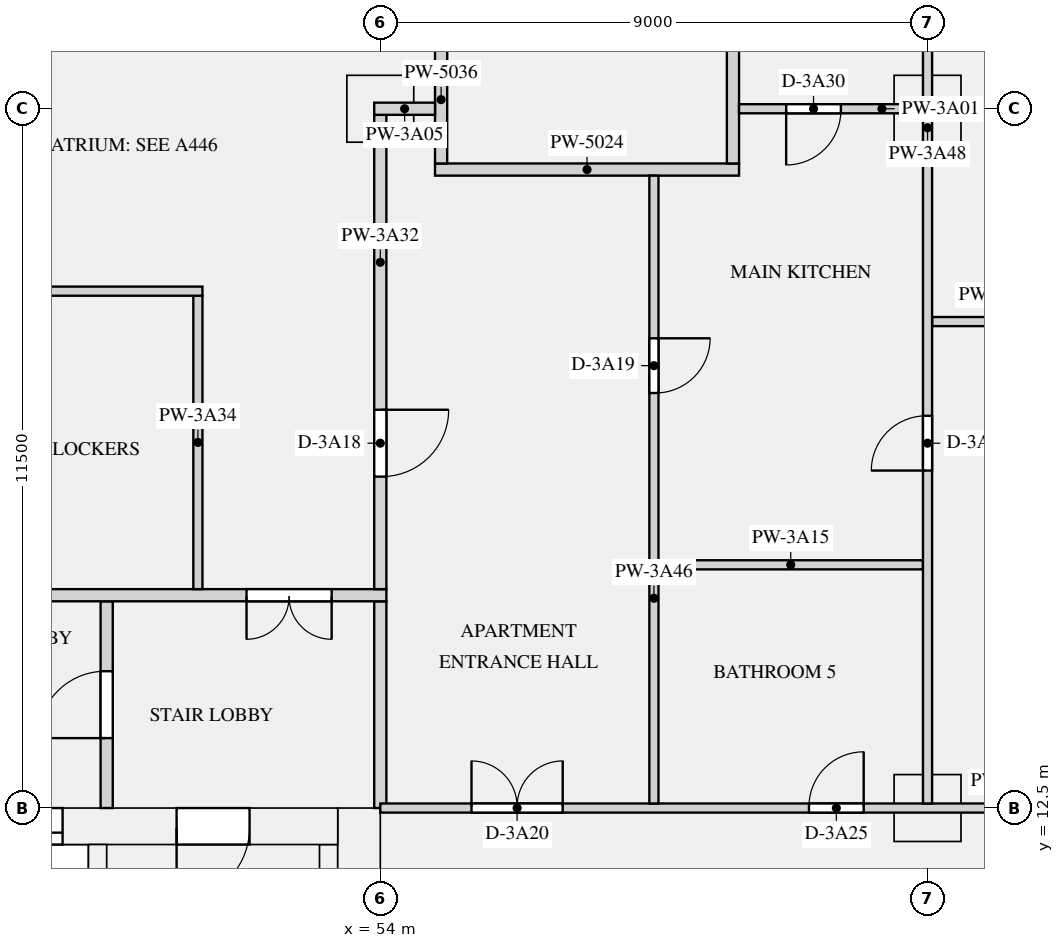
"""IFC4 building model, lengths in metres.
Left out: names, types, materials, properties, quantities, classifications, styles, units other than length and angle.
Written with IfcOpenShell. Run it as: python <this file> out.ifc"""

import sys

from ifc_helpers import new_model, si_unit, direction, frame, frame_2d, origin, origin_2d, place, context, subcontext, project, spatial, rectangle, extrude, element, fill, save


model = new_model("IFC4")
c1 = context("Model", 3, precision=1e-05, world=origin(), true_north=direction((0.0, 1.0)))
c2 = subcontext(c1, "Body", "Model", "MODEL_VIEW")
j1 = project(units=[si_unit("LENGTHUNIT", "METRE"), si_unit("PLANEANGLEUNIT", "RADIAN")], contexts=[c1])
p1 = place(None, origin())
s1 = spatial("IfcSite", under=j1, at=p1, CompositionType="ELEMENT")
p2 = place(p1, origin())
s2 = spatial("IfcBuilding", under=s1, at=p2, CompositionType="ELEMENT")
p3 = place(p2, frame((0.0, 0.0, 144.45)))
s3 = spatial("IfcBuildingStorey", under=s2, at=p3, CompositionType="ELEMENT", Elevation=144.45)
for number, where, z_axis, x_axis in (
    (1, (54.0, 24.0, 0.0), (0.0, 0.0, 1.0), (1.0, 0.0, 0.0)),
    (2, (63.0, 24.0, 0.0), (0.0, 0.0, 1.0), (1.0, 0.0, 0.0)),
    (3, (63.0, 12.5, 0.0), (0.0, 0.0, 1.0), (1.0, 0.0, 0.0)),
):
    element("IfcColumn", number, at=place(p3, frame(where, z_axis=z_axis, x_axis=x_axis)), inside=s3, PredefinedType="COLUMN", context=c2, shape_type="SweptSolid", body=[
        extrude(rectangle(XDim=1.1, YDim=1.1, at=origin_2d()), origin(), (0.0, 0.0, 1.0), 3.15),
    ])
p4 = place(p3, frame((53.65, 0.0, 0.0), z_axis=(0.0, 0.0, 1.0), x_axis=(0.0, 1.0, 0.0)))
e4 = element("IfcWall", 4, at=p4, inside=s3, PredefinedType="SHEAR", context=c2, shape_type="SweptSolid", body=[
    extrude(rectangle(XDim=12.5, YDim=0.7, at=frame_2d((6.25, 0.0))), origin(), (0.0, 0.0, 1.0), 3.15),
])
p5 = place(p3, frame((18.7, 12.2, 0.0), z_axis=(0.0, 0.0, 1.0), x_axis=(1.0, 0.0, 0.0)))
e5 = element("IfcWall", 5, at=p5, inside=s3, PredefinedType="SHEAR", context=c2, shape_type="SweptSolid", body=[
    extrude(rectangle(XDim=34.6, YDim=0.6, at=frame_2d((17.3, 0.0))), origin(), (0.0, 0.0, 1.0), 3.15),
])
p6 = place(p5, frame((24.475, 0.0, 0.0)))
e6 = element("IfcOpeningElement", 6, at=p6, cuts=e5, PredefinedType="OPENING", context=c2, shape_type="SweptSolid", body=[
    extrude(rectangle(XDim=1.1, YDim=2.1, at=frame_2d((0.55, 1.05))), frame((0.0, 0.31, 0.0), z_axis=(0.0, -1.0, 0.0), x_axis=(1.0, 0.0, 0.0)), (0.0, 0.0, 1.0), 0.62),
])
p7 = place(p5, frame((26.725, 0.0, 0.0)))
e7 = element("IfcOpeningElement", 7, at=p7, cuts=e5, PredefinedType="OPENING", context=c2, shape_type="SweptSolid", body=[
    extrude(rectangle(XDim=1.1, YDim=2.1, at=frame_2d((0.55, 1.05))), frame((0.0, 0.31, 0.0), z_axis=(0.0, -1.0, 0.0), x_axis=(1.0, 0.0, 0.0)), (0.0, 0.0, 1.0), 0.62),
])
p8 = place(p5, frame((28.975, 0.0, 0.0)))
e8 = element("IfcOpeningElement", 8, at=p8, cuts=e5, PredefinedType="OPENING", context=c2, shape_type="SweptSolid", body=[
    extrude(rectangle(XDim=1.1, YDim=2.1, at=frame_2d((0.55, 1.05))), frame((0.0, 0.31, 0.0), z_axis=(0.0, -1.0, 0.0), x_axis=(1.0, 0.0, 0.0)), (0.0, 0.0, 1.0), 0.62),
])
p9 = place(p5, frame((14.35, 0.0, 0.0)))
e9 = element("IfcOpeningElement", 9, at=p9, cuts=e5, PredefinedType="OPENING", context=c2, shape_type="SweptSolid", body=[
    extrude(rectangle(XDim=0.9, YDim=2.1, at=frame_2d((0.45, 1.05))), frame((0.0, 0.31, 0.0), z_axis=(0.0, -1.0, 0.0), x_axis=(1.0, 0.0, 0.0)), (0.0, 0.0, 1.0), 0.62),
])
p10 = place(p5, frame((1.45, 0.0, 0.0)))
e10 = element("IfcOpeningElement", 10, at=p10, cuts=e5, PredefinedType="OPENING", context=c2, shape_type="SweptSolid", body=[
    extrude(rectangle(XDim=1.2, YDim=2.1, at=frame_2d((0.6, 1.05))), frame((0.0, 0.31, 0.0), z_axis=(0.0, -1.0, 0.0), x_axis=(1.0, 0.0, 0.0)), (0.0, 0.0, 1.0), 0.62),
])
p11 = place(p5, frame((31.95, 0.0, 0.0)))
e11 = element("IfcOpeningElement", 11, at=p11, cuts=e5, PredefinedType="OPENING", context=c2, shape_type="SweptSolid", body=[
    extrude(rectangle(XDim=1.2, YDim=2.1, at=frame_2d((0.6, 1.05))), frame((0.0, 0.31, 0.0), z_axis=(0.0, -1.0, 0.0), x_axis=(1.0, 0.0, 0.0)), (0.0, 0.0, 1.0), 0.62),
])
p12 = place(p3, frame((53.15, 1.0, 0.0), z_axis=(0.0, 0.0, 1.0), x_axis=(0.0, 1.0, 0.0)))
e12 = element("IfcWall", 12, at=p12, inside=s3, PredefinedType="SHEAR", context=c2, shape_type="SweptSolid", body=[
    extrude(rectangle(XDim=10.9, YDim=0.3, at=frame_2d((5.45, 0.0))), origin(), (0.0, 0.0, 1.0), 3.15),
])
p13 = place(p3, frame((49.35, 8.25, 0.0), z_axis=(0.0, 0.0, 1.0), x_axis=(0.0, 1.0, 0.0)))
e13 = element("IfcWall", 13, at=p13, inside=s3, PredefinedType="SHEAR", context=c2, shape_type="SweptSolid", body=[
    extrude(rectangle(XDim=3.65, YDim=0.3, at=frame_2d((1.825, 0.0))), origin(), (0.0, 0.0, 1.0), 3.15),
])
p14 = place(p3, frame((54.9, 23.0, 0.0), z_axis=(0.0, 0.0, 1.0), x_axis=(1.0, 0.0, 0.0)))
e14 = element("IfcWall", 14, at=p14, inside=s3, PredefinedType="PARTITIONING", context=c2, shape_type="SweptSolid", body=[
    extrude(rectangle(XDim=5.0, YDim=0.2, at=frame_2d((2.5, 0.0))), origin(), (0.0, 0.0, 1.0), 2.83),
])
p15 = place(p3, frame((49.5, 12.5, 0.0), z_axis=(0.0, 0.0, 1.0), x_axis=(0.0, 1.0, 0.0)))
e15 = element("IfcWall", 15, at=p15, inside=s3, PredefinedType="PARTITIONING", context=c2, shape_type="SweptSolid", body=[
    extrude(rectangle(XDim=3.4, YDim=0.2, at=frame_2d((1.7, 0.0))), origin(), (0.0, 0.0, 1.0), 2.83),
])
p16 = place(p15, frame((1.15, 0.0, 0.0)))
e16 = element("IfcOpeningElement", 16, at=p16, cuts=e15, PredefinedType="OPENING", context=c2, shape_type="SweptSolid", body=[
    extrude(rectangle(XDim=1.1, YDim=2.1, at=frame_2d((0.55, 1.05))), frame((0.0, 0.11, 0.0), z_axis=(0.0, -1.0, 0.0), x_axis=(1.0, 0.0, 0.0)), (0.0, 0.0, 1.0), 0.22),
])
p17 = place(p3, frame((54.0, 12.5, 0.0), z_axis=(0.0, 0.0, 1.0), x_axis=(0.0, 1.0, 0.0)))
e17 = element("IfcWall", 17, at=p17, inside=s3, PredefinedType="PARTITIONING", context=c2, shape_type="SweptSolid", body=[
    extrude(rectangle(XDim=3.4, YDim=0.2, at=frame_2d((1.7, 0.0))), origin(), (0.0, 0.0, 1.0), 2.83),
])
p18 = place(p3, frame((55.0, 23.1, 0.0), z_axis=(0.0, 0.0, 1.0), x_axis=(0.0, 1.0, 0.0)))
e18 = element("IfcWall", 18, at=p18, inside=s3, PredefinedType="PARTITIONING", context=c2, shape_type="SweptSolid", body=[
    extrude(rectangle(XDim=3.8, YDim=0.2, at=frame_2d((1.9, 0.0))), origin(), (0.0, 0.0, 1.0), 2.83),
])
p19 = place(p18, frame((2.1, 0.0, 0.0)))
e19 = element("IfcOpeningElement", 19, at=p19, cuts=e18, PredefinedType="OPENING", context=c2, shape_type="SweptSolid", body=[
    extrude(rectangle(XDim=1.2, YDim=2.1, at=frame_2d((0.6, 1.05))), frame((0.0, 0.11, 0.0), z_axis=(0.0, -1.0, 0.0), x_axis=(1.0, 0.0, 0.0)), (0.0, 0.0, 1.0), 0.22),
])
p20 = place(p3, frame((59.8, 23.1, 0.0), z_axis=(0.0, 0.0, 1.0), x_axis=(0.0, 1.0, 0.0)))
e20 = element("IfcWall", 20, at=p20, inside=s3, PredefinedType="PARTITIONING", context=c2, shape_type="SweptSolid", body=[
    extrude(rectangle(XDim=3.9, YDim=0.2, at=frame_2d((1.95, 0.0))), origin(), (0.0, 0.0, 1.0), 2.83),
])
p21 = place(p3, frame((59.9, 24.0, 0.0), z_axis=(0.0, 0.0, 1.0), x_axis=(1.0, 0.0, 0.0)))
e21 = element("IfcWall", 21, at=p21, inside=s3, PredefinedType="PARTITIONING", context=c2, shape_type="SweptSolid", body=[
    extrude(rectangle(XDim=3.025, YDim=0.15, at=frame_2d((1.513, 0.0))), origin(), (0.0, 0.0, 1.0), 2.83),
])
p22 = place(p21, frame((0.775, 0.0, 0.0)))
e22 = element("IfcOpeningElement", 22, at=p22, cuts=e21, PredefinedType="OPENING", context=c2, shape_type="SweptSolid", body=[
    extrude(rectangle(XDim=0.9, YDim=2.1, at=frame_2d((0.45, 1.05))), frame((0.0, 0.085, 0.0), z_axis=(0.0, -1.0, 0.0), x_axis=(1.0, 0.0, 0.0)), (0.0, 0.0, 1.0), 0.17),
])
p23 = place(p3, frame((53.9, 24.0, 0.0), z_axis=(0.0, 0.0, 1.0), x_axis=(1.0, 0.0, 0.0)))
e23 = element("IfcWall", 23, at=p23, inside=s3, PredefinedType="PARTITIONING", context=c2, shape_type="SweptSolid", body=[
    extrude(rectangle(XDim=1.0, YDim=0.2, at=frame_2d((0.5, 0.0))), origin(), (0.0, 0.0, 1.0), 2.83),
])
p24 = place(p3, frame((20.925, 21.0, 0.0), z_axis=(0.0, 0.0, 1.0), x_axis=(1.0, 0.0, 0.0)))
e24 = element("IfcWall", 24, at=p24, inside=s3, PredefinedType="PARTITIONING", context=c2, shape_type="SweptSolid", body=[
    extrude(rectangle(XDim=30.15, YDim=0.15, at=frame_2d((15.075, 0.0))), origin(), (0.0, 0.0, 1.0), 2.83),
])
p25 = place(p24, frame((2.625, 0.0, 0.0)))
e25 = element("IfcOpeningElement", 25, at=p25, cuts=e24, PredefinedType="OPENING", context=c2, shape_type="SweptSolid", body=[
    extrude(rectangle(XDim=0.9, YDim=2.1, at=frame_2d((0.45, 1.05))), frame((0.0, 0.085, 0.0), z_axis=(0.0, -1.0, 0.0), x_axis=(1.0, 0.0, 0.0)), (0.0, 0.0, 1.0), 0.17),
])
p26 = place(p24, frame((8.625, 0.0, 0.0)))
e26 = element("IfcOpeningElement", 26, at=p26, cuts=e24, PredefinedType="OPENING", context=c2, shape_type="SweptSolid", body=[
    extrude(rectangle(XDim=0.9, YDim=2.1, at=frame_2d((0.45, 1.05))), frame((0.0, 0.085, 0.0), z_axis=(0.0, -1.0, 0.0), x_axis=(1.0, 0.0, 0.0)), (0.0, 0.0, 1.0), 0.17),
])
p27 = place(p24, frame((14.625, 0.0, 0.0)))
e27 = element("IfcOpeningElement", 27, at=p27, cuts=e24, PredefinedType="OPENING", context=c2, shape_type="SweptSolid", body=[
    extrude(rectangle(XDim=0.9, YDim=2.1, at=frame_2d((0.45, 1.05))), frame((0.0, 0.085, 0.0), z_axis=(0.0, -1.0, 0.0), x_axis=(1.0, 0.0, 0.0)), (0.0, 0.0, 1.0), 0.17),
])
p28 = place(p24, frame((20.625, 0.0, 0.0)))
e28 = element("IfcOpeningElement", 28, at=p28, cuts=e24, PredefinedType="OPENING", context=c2, shape_type="SweptSolid", body=[
    extrude(rectangle(XDim=0.9, YDim=2.1, at=frame_2d((0.45, 1.05))), frame((0.0, 0.085, 0.0), z_axis=(0.0, -1.0, 0.0), x_axis=(1.0, 0.0, 0.0)), (0.0, 0.0, 1.0), 0.17),
])
p29 = place(p24, frame((26.625, 0.0, 0.0)))
e29 = element("IfcOpeningElement", 29, at=p29, cuts=e24, PredefinedType="OPENING", context=c2, shape_type="SweptSolid", body=[
    extrude(rectangle(XDim=0.9, YDim=2.1, at=frame_2d((0.45, 1.05))), frame((0.0, 0.085, 0.0), z_axis=(0.0, -1.0, 0.0), x_axis=(1.0, 0.0, 0.0)), (0.0, 0.0, 1.0), 0.17),
])
p30 = place(p3, frame((54.0, 12.5, 0.0), z_axis=(0.0, 0.0, 1.0), x_axis=(1.0, 0.0, 0.0)))
e30 = element("IfcWall", 30, at=p30, inside=s3, PredefinedType="PARTITIONING", context=c2, shape_type="SweptSolid", body=[
    extrude(rectangle(XDim=17.3, YDim=0.15, at=frame_2d((8.65, 0.0))), origin(), (0.0, 0.0, 1.0), 2.83),
])
p31 = place(p30, frame((1.5, 0.0, 0.0)))
e31 = element("IfcOpeningElement", 31, at=p31, cuts=e30, PredefinedType="OPENING", context=c2, shape_type="SweptSolid", body=[
    extrude(rectangle(XDim=1.5, YDim=2.1, at=frame_2d((0.75, 1.05))), frame((0.0, 0.085, 0.0), z_axis=(0.0, -1.0, 0.0), x_axis=(1.0, 0.0, 0.0)), (0.0, 0.0, 1.0), 0.17),
])
p32 = place(p30, frame((7.05, 0.0, 0.0)))
e32 = element("IfcOpeningElement", 32, at=p32, cuts=e30, PredefinedType="OPENING", context=c2, shape_type="SweptSolid", body=[
    extrude(rectangle(XDim=0.9, YDim=2.1, at=frame_2d((0.45, 1.05))), frame((0.0, 0.085, 0.0), z_axis=(0.0, -1.0, 0.0), x_axis=(1.0, 0.0, 0.0)), (0.0, 0.0, 1.0), 0.17),
])
p33 = place(p30, frame((12.75, 0.0, 0.0)))
e33 = element("IfcOpeningElement", 33, at=p33, cuts=e30, PredefinedType="OPENING", context=c2, shape_type="SweptSolid", body=[
    extrude(rectangle(XDim=1.5, YDim=2.1, at=frame_2d((0.75, 1.05))), frame((0.0, 0.085, 0.0), z_axis=(0.0, -1.0, 0.0), x_axis=(1.0, 0.0, 0.0)), (0.0, 0.0, 1.0), 0.17),
])
p34 = place(p3, frame((58.575, 16.5, 0.0), z_axis=(0.0, 0.0, 1.0), x_axis=(1.0, 0.0, 0.0)))
e34 = element("IfcWall", 34, at=p34, inside=s3, PredefinedType="PARTITIONING", context=c2, shape_type="SweptSolid", body=[
    extrude(rectangle(XDim=4.35, YDim=0.15, at=frame_2d((2.175, 0.0))), origin(), (0.0, 0.0, 1.0), 2.83),
])
p35 = place(p3, frame((63.075, 20.5, 0.0), z_axis=(0.0, 0.0, 1.0), x_axis=(1.0, 0.0, 0.0)))
e35 = element("IfcWall", 35, at=p35, inside=s3, PredefinedType="PARTITIONING", context=c2, shape_type="SweptSolid", body=[
    extrude(rectangle(XDim=5.725, YDim=0.15, at=frame_2d((2.863, 0.0))), origin(), (0.0, 0.0, 1.0), 2.83),
])
p36 = place(p35, frame((2.15, 0.0, 0.0)))
e36 = element("IfcOpeningElement", 36, at=p36, cuts=e35, PredefinedType="OPENING", context=c2, shape_type="SweptSolid", body=[
    extrude(rectangle(XDim=1.5, YDim=2.1, at=frame_2d((0.75, 1.05))), frame((0.0, 0.085, 0.0), z_axis=(0.0, -1.0, 0.0), x_axis=(1.0, 0.0, 0.0)), (0.0, 0.0, 1.0), 0.17),
])
p37 = place(p3, frame((17.9, 16.0, 0.0), z_axis=(0.0, 0.0, 1.0), x_axis=(1.0, 0.0, 0.0)))
e37 = element("IfcWall", 37, at=p37, inside=s3, PredefinedType="PARTITIONING", context=c2, shape_type="SweptSolid", body=[
    extrude(rectangle(XDim=36.2, YDim=0.2, at=frame_2d((18.1, 0.0))), origin(), (0.0, 0.0, 1.0), 2.83),
])
p38 = place(p37, frame((0.9, 0.0, 0.0)))
e38 = element("IfcOpeningElement", 38, at=p38, cuts=e37, PredefinedType="OPENING", context=c2, shape_type="SweptSolid", body=[
    extrude(rectangle(XDim=1.4, YDim=2.1, at=frame_2d((0.7, 1.05))), frame((0.0, 0.11, 0.0), z_axis=(0.0, -1.0, 0.0), x_axis=(1.0, 0.0, 0.0)), (0.0, 0.0, 1.0), 0.22),
])
p39 = place(p37, frame((33.9, 0.0, 0.0)))
e39 = element("IfcOpeningElement", 39, at=p39, cuts=e37, PredefinedType="OPENING", context=c2, shape_type="SweptSolid", body=[
    extrude(rectangle(XDim=1.4, YDim=2.1, at=frame_2d((0.7, 1.05))), frame((0.0, 0.11, 0.0), z_axis=(0.0, -1.0, 0.0), x_axis=(1.0, 0.0, 0.0)), (0.0, 0.0, 1.0), 0.22),
])
p40 = place(p3, frame((54.0, 16.1, 0.0), z_axis=(0.0, 0.0, 1.0), x_axis=(0.0, 1.0, 0.0)))
e40 = element("IfcWall", 40, at=p40, inside=s3, PredefinedType="PARTITIONING", context=c2, shape_type="SweptSolid", body=[
    extrude(rectangle(XDim=7.8, YDim=0.2, at=frame_2d((3.9, 0.0))), origin(), (0.0, 0.0, 1.0), 2.83),
])
p41 = place(p40, frame((1.85, 0.0, 0.0)))
e41 = element("IfcOpeningElement", 41, at=p41, cuts=e40, PredefinedType="OPENING", context=c2, shape_type="SweptSolid", body=[
    extrude(rectangle(XDim=1.1, YDim=2.1, at=frame_2d((0.55, 1.05))), frame((0.0, 0.11, 0.0), z_axis=(0.0, -1.0, 0.0), x_axis=(1.0, 0.0, 0.0)), (0.0, 0.0, 1.0), 0.22),
])
p42 = place(p3, frame((51.0, 16.1, 0.0), z_axis=(0.0, 0.0, 1.0), x_axis=(0.0, 1.0, 0.0)))
e42 = element("IfcWall", 42, at=p42, inside=s3, PredefinedType="PARTITIONING", context=c2, shape_type="SweptSolid", body=[
    extrude(rectangle(XDim=4.825, YDim=0.15, at=frame_2d((2.413, 0.0))), origin(), (0.0, 0.0, 1.0), 2.83),
])
p43 = place(p3, frame((58.5, 12.575, 0.0), z_axis=(0.0, 0.0, 1.0), x_axis=(0.0, 1.0, 0.0)))
e43 = element("IfcWall", 43, at=p43, inside=s3, PredefinedType="PARTITIONING", context=c2, shape_type="SweptSolid", body=[
    extrude(rectangle(XDim=10.325, YDim=0.15, at=frame_2d((5.163, 0.0))), origin(), (0.0, 0.0, 1.0), 2.83),
])
p44 = place(p43, frame((6.75, 0.0, 0.0)))
e44 = element("IfcOpeningElement", 44, at=p44, cuts=e43, PredefinedType="OPENING", context=c2, shape_type="SweptSolid", body=[
    extrude(rectangle(XDim=0.9, YDim=2.1, at=frame_2d((0.45, 1.05))), frame((0.0, 0.085, 0.0), z_axis=(0.0, -1.0, 0.0), x_axis=(1.0, 0.0, 0.0)), (0.0, 0.0, 1.0), 0.17),
])
p45 = place(p3, frame((63.0, 12.575, 0.0), z_axis=(0.0, 0.0, 1.0), x_axis=(0.0, 1.0, 0.0)))
e45 = element("IfcWall", 45, at=p45, inside=s3, PredefinedType="PARTITIONING", context=c2, shape_type="SweptSolid", body=[
    extrude(rectangle(XDim=15.85, YDim=0.15, at=frame_2d((7.925, 0.0))), origin(), (0.0, 0.0, 1.0), 2.83),
])
p46 = place(p45, frame((5.475, 0.0, 0.0)))
e46 = element("IfcOpeningElement", 46, at=p46, cuts=e45, PredefinedType="OPENING", context=c2, shape_type="SweptSolid", body=[
    extrude(rectangle(XDim=0.9, YDim=2.1, at=frame_2d((0.45, 1.05))), frame((0.0, 0.085, 0.0), z_axis=(0.0, -1.0, 0.0), x_axis=(1.0, 0.0, 0.0)), (0.0, 0.0, 1.0), 0.17),
])
p47 = place(p8, origin())
e47 = element("IfcDoor", 47, at=p47, inside=s3, OperationType="DOUBLE_DOOR_SLIDING", PredefinedType="DOOR", context=c2, shape_type="SweptSolid", body=[
    extrude(rectangle(XDim=1.1, YDim=2.1, at=frame_2d((0.55, 1.05))), frame((0.0, 0.025, 0.0), z_axis=(0.0, -1.0, 0.0), x_axis=(1.0, 0.0, 0.0)), (0.0, 0.0, 1.0), 0.05),
])
fill(e8, e47)
p48 = place(p11, frame((1.2, 0.0, 0.0), z_axis=(0.0, 0.0, 1.0), x_axis=(-1.0, 0.0, 0.0)))
e48 = element("IfcDoor", 48, at=p48, inside=s3, OperationType="SINGLE_SWING_RIGHT", PredefinedType="DOOR", context=c2, shape_type="SweptSolid", body=[
    extrude(rectangle(XDim=1.2, YDim=2.1, at=frame_2d((0.6, 1.05))), frame((0.0, 0.025, 0.0), z_axis=(0.0, -1.0, 0.0), x_axis=(1.0, 0.0, 0.0)), (0.0, 0.0, 1.0), 0.05),
])
fill(e11, e48)
p49 = place(p16, origin())
e49 = element("IfcDoor", 49, at=p49, inside=s3, OperationType="SINGLE_SWING_LEFT", PredefinedType="DOOR", context=c2, shape_type="SweptSolid", body=[
    extrude(rectangle(XDim=1.1, YDim=2.1, at=frame_2d((0.55, 1.05))), frame((0.0, 0.025, 0.0), z_axis=(0.0, -1.0, 0.0), x_axis=(1.0, 0.0, 0.0)), (0.0, 0.0, 1.0), 0.05),
])
fill(e16, e49)
p50 = place(p39, frame((1.4, 0.0, 0.0), z_axis=(0.0, 0.0, 1.0), x_axis=(-1.0, 0.0, 0.0)))
e50 = element("IfcDoor", 50, at=p50, inside=s3, OperationType="DOUBLE_DOOR_SINGLE_SWING", PredefinedType="DOOR", context=c2, shape_type="SweptSolid", body=[
    extrude(rectangle(XDim=1.4, YDim=2.1, at=frame_2d((0.7, 1.05))), frame((0.0, 0.025, 0.0), z_axis=(0.0, -1.0, 0.0), x_axis=(1.0, 0.0, 0.0)), (0.0, 0.0, 1.0), 0.05),
])
fill(e39, e50)
p51 = place(p41, frame((1.1, 0.0, 0.0), z_axis=(0.0, 0.0, 1.0), x_axis=(-1.0, 0.0, 0.0)))
e51 = element("IfcDoor", 51, at=p51, inside=s3, OperationType="SINGLE_SWING_LEFT", PredefinedType="DOOR", context=c2, shape_type="SweptSolid", body=[
    extrude(rectangle(XDim=1.1, YDim=2.1, at=frame_2d((0.55, 1.05))), frame((0.0, 0.025, 0.0), z_axis=(0.0, -1.0, 0.0), x_axis=(1.0, 0.0, 0.0)), (0.0, 0.0, 1.0), 0.05),
])
fill(e41, e51)
p52 = place(p44, frame((0.9, 0.0, 0.0), z_axis=(0.0, 0.0, 1.0), x_axis=(-1.0, 0.0, 0.0)))
e52 = element("IfcDoor", 52, at=p52, inside=s3, OperationType="SINGLE_SWING_LEFT", PredefinedType="DOOR", context=c2, shape_type="SweptSolid", body=[
    extrude(rectangle(XDim=0.9, YDim=2.1, at=frame_2d((0.45, 1.05))), frame((0.0, 0.025, 0.0), z_axis=(0.0, -1.0, 0.0), x_axis=(1.0, 0.0, 0.0)), (0.0, 0.0, 1.0), 0.05),
])
fill(e44, e52)
p53 = place(p31, origin())
e53 = element("IfcDoor", 53, at=p53, inside=s3, OperationType="DOUBLE_DOOR_SINGLE_SWING", PredefinedType="DOOR", context=c2, shape_type="SweptSolid", body=[
    extrude(rectangle(XDim=1.5, YDim=2.1, at=frame_2d((0.75, 1.05))), frame((0.0, 0.025, 0.0), z_axis=(0.0, -1.0, 0.0), x_axis=(1.0, 0.0, 0.0)), (0.0, 0.0, 1.0), 0.05),
])
fill(e31, e53)
p54 = place(p32, origin())
e54 = element("IfcDoor", 54, at=p54, inside=s3, OperationType="SINGLE_SWING_RIGHT", PredefinedType="DOOR", context=c2, shape_type="SweptSolid", body=[
    extrude(rectangle(XDim=0.9, YDim=2.1, at=frame_2d((0.45, 1.05))), frame((0.0, 0.025, 0.0), z_axis=(0.0, -1.0, 0.0), x_axis=(1.0, 0.0, 0.0)), (0.0, 0.0, 1.0), 0.05),
])
fill(e32, e54)
p55 = place(p46, origin())
e55 = element("IfcDoor", 55, at=p55, inside=s3, OperationType="SINGLE_SWING_LEFT", PredefinedType="DOOR", context=c2, shape_type="SweptSolid", body=[
    extrude(rectangle(XDim=0.9, YDim=2.1, at=frame_2d((0.45, 1.05))), frame((0.0, 0.025, 0.0), z_axis=(0.0, -1.0, 0.0), x_axis=(1.0, 0.0, 0.0)), (0.0, 0.0, 1.0), 0.05),
])
fill(e46, e55)
p56 = place(p22, frame((0.9, 0.0, 0.0), z_axis=(0.0, 0.0, 1.0), x_axis=(-1.0, 0.0, 0.0)))
e56 = element("IfcDoor", 56, at=p56, inside=s3, OperationType="SINGLE_SWING_RIGHT", PredefinedType="DOOR", context=c2, shape_type="SweptSolid", body=[
    extrude(rectangle(XDim=0.9, YDim=2.1, at=frame_2d((0.45, 1.05))), frame((0.0, 0.025, 0.0), z_axis=(0.0, -1.0, 0.0), x_axis=(1.0, 0.0, 0.0)), (0.0, 0.0, 1.0), 0.05),
])
fill(e22, e56)
save(model, sys.argv[1])
